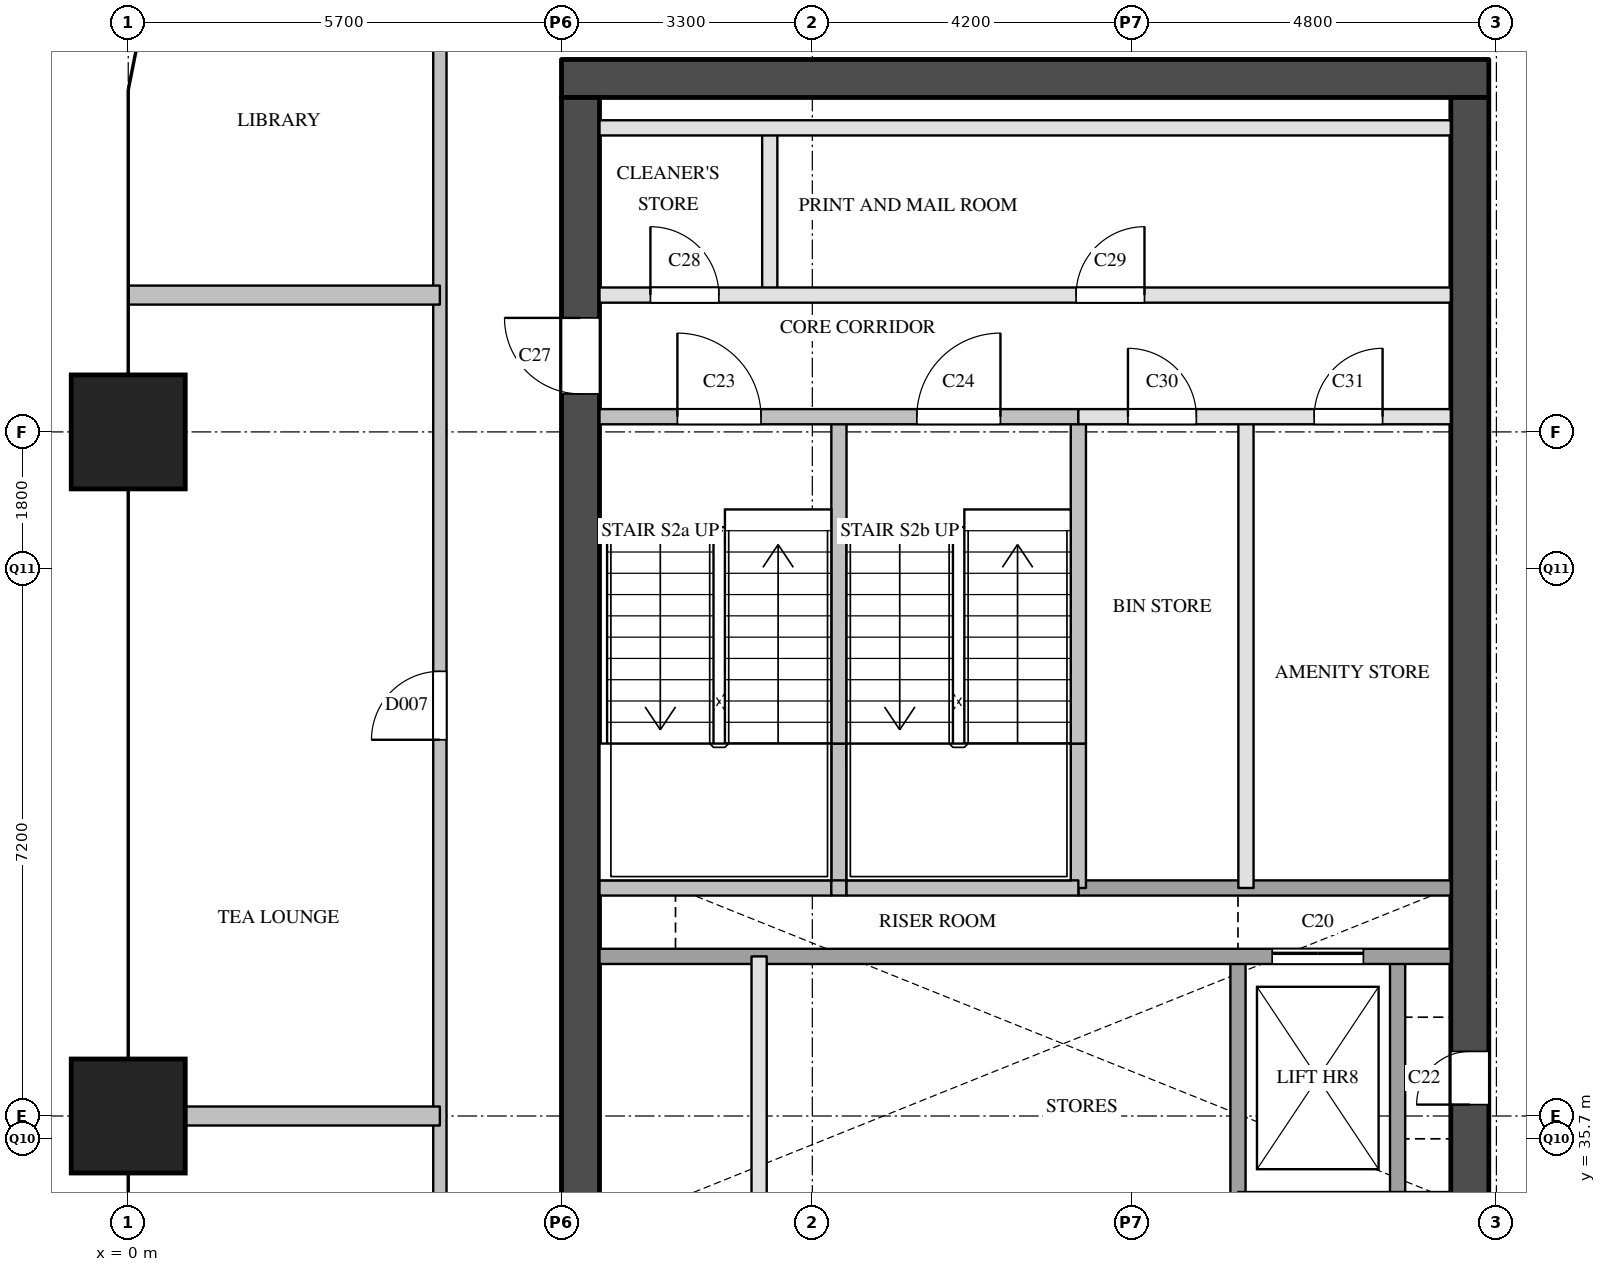
"""IFC4 building model, lengths in metres.
Left out: names, types, materials, properties, quantities, classifications, styles, units other than length and angle.
Written with IfcOpenShell. Run it as: python <this file> out.ifc"""

import sys

from ifc_helpers import new_model, si_unit, direction, frame, frame_2d, origin, origin_2d, place, context, subcontext, project, spatial, rectangle, extrude, element, fill, save


model = new_model("IFC4")
c1 = context("Model", 3, precision=1e-05, world=origin(), true_north=direction((0.0, 1.0)))
c2 = subcontext(c1, "Body", "Model", "MODEL_VIEW")
j1 = project(units=[si_unit("LENGTHUNIT", "METRE"), si_unit("PLANEANGLEUNIT", "RADIAN")], contexts=[c1])
p1 = place(None, origin())
s1 = spatial("IfcSite", under=j1, at=p1, CompositionType="ELEMENT")
p2 = place(p1, origin())
s2 = spatial("IfcBuilding", under=s1, at=p2, CompositionType="ELEMENT")
p3 = place(p2, frame((0.0, 0.0, 166.1)))
s3 = spatial("IfcBuildingStorey", under=s2, at=p3, CompositionType="ELEMENT", Elevation=166.1)
for number, where, z_axis, x_axis in (
    (1, (0.0, 36.0, 0.0), (0.0, 0.0, 1.0), (1.0, 0.0, 0.0)),
    (2, (0.0, 45.0, 0.0), (0.0, 0.0, 1.0), (1.0, 0.0, 0.0)),
):
    element("IfcColumn", number, at=place(p3, frame(where, z_axis=z_axis, x_axis=x_axis)), inside=s3, PredefinedType="COLUMN", context=c2, shape_type="SweptSolid", body=[
        extrude(rectangle(XDim=1.5, YDim=1.5, at=origin_2d()), origin(), (0.0, 0.0, 1.0), 3.9),
    ])
p4 = place(p3, frame((5.7, 49.65, 0.0), z_axis=(0.0, 0.0, 1.0), x_axis=(1.0, 0.0, 0.0)))
e3 = element("IfcWall", 3, at=p4, inside=s3, PredefinedType="SHEAR", context=c2, shape_type="SweptSolid", body=[
    extrude(rectangle(XDim=12.2, YDim=0.5, at=frame_2d((6.1, 0.0))), origin(), (0.0, 0.0, 1.0), 3.6),
])
p5 = place(p3, frame((5.95, 29.1, 0.0), z_axis=(0.0, 0.0, 1.0), x_axis=(0.0, 1.0, 0.0)))
e4 = element("IfcWall", 4, at=p5, inside=s3, PredefinedType="SHEAR", context=c2, shape_type="SweptSolid", body=[
    extrude(rectangle(XDim=20.3, YDim=0.5, at=frame_2d((10.15, 0.0))), origin(), (0.0, 0.0, 1.0), 3.6),
])
p6 = place(p5, frame((3.45, 0.0, 0.0)))
e5 = element("IfcOpeningElement", 5, at=p6, cuts=e4, PredefinedType="OPENING", context=c2, shape_type="SweptSolid", body=[
    extrude(rectangle(XDim=1.0, YDim=2.1, at=frame_2d((0.5, 1.05))), frame((0.0, 0.26, 0.0), z_axis=(0.0, -1.0, 0.0), x_axis=(1.0, 0.0, 0.0)), (0.0, 0.0, 1.0), 0.52),
])
p7 = place(p5, frame((16.4, 0.0, 0.0)))
e6 = element("IfcOpeningElement", 6, at=p7, cuts=e4, PredefinedType="OPENING", context=c2, shape_type="SweptSolid", body=[
    extrude(rectangle(XDim=1.0, YDim=2.1, at=frame_2d((0.5, 1.05))), frame((0.0, 0.26, 0.0), z_axis=(0.0, -1.0, 0.0), x_axis=(1.0, 0.0, 0.0)), (0.0, 0.0, 1.0), 0.52),
])
p8 = place(p3, frame((17.65, 29.1, 0.0), z_axis=(0.0, 0.0, 1.0), x_axis=(0.0, 1.0, 0.0)))
e7 = element("IfcWall", 7, at=p8, inside=s3, PredefinedType="SHEAR", context=c2, shape_type="SweptSolid", body=[
    extrude(rectangle(XDim=20.3, YDim=0.5, at=frame_2d((10.15, 0.0))), origin(), (0.0, 0.0, 1.0), 3.6),
])
p9 = place(p8, frame((1.25, 0.0, 0.0)))
e8 = element("IfcOpeningElement", 8, at=p9, cuts=e7, PredefinedType="OPENING", context=c2, shape_type="SweptSolid", body=[
    extrude(rectangle(XDim=0.7, YDim=2.1, at=frame_2d((0.35, 1.05))), frame((0.0, 0.26, 0.0), z_axis=(0.0, -1.0, 0.0), x_axis=(1.0, 0.0, 0.0)), (0.0, 0.0, 1.0), 0.52),
])
p10 = place(p8, frame((7.05, 0.0, 0.0)))
e9 = element("IfcOpeningElement", 9, at=p10, cuts=e7, PredefinedType="OPENING", context=c2, shape_type="SweptSolid", body=[
    extrude(rectangle(XDim=0.7, YDim=2.1, at=frame_2d((0.35, 1.05))), frame((0.0, 0.26, 0.0), z_axis=(0.0, -1.0, 0.0), x_axis=(1.0, 0.0, 0.0)), (0.0, 0.0, 1.0), 0.52),
])
p11 = place(p8, frame((3.6, 0.0, 0.0)))
e10 = element("IfcOpeningElement", 10, at=p11, cuts=e7, PredefinedType="OPENING", context=c2, shape_type="SweptSolid", body=[
    extrude(rectangle(XDim=1.8, YDim=2.1, at=frame_2d((0.9, 1.05))), frame((0.0, 0.26, 0.0), z_axis=(0.0, -1.0, 0.0), x_axis=(1.0, 0.0, 0.0)), (0.0, 0.0, 1.0), 0.52),
])
p12 = place(p3, frame((8.3, 33.8, 0.0), z_axis=(0.0, 0.0, 1.0), x_axis=(0.0, 1.0, 0.0)))
e11 = element("IfcWall", 11, at=p12, inside=s3, PredefinedType="PARTITIONING", context=c2, shape_type="SweptSolid", body=[
    extrude(rectangle(XDim=4.3, YDim=0.2, at=frame_2d((2.15, 0.0))), origin(), (0.0, 0.0, 1.0), 3.6),
])
p13 = place(p3, frame((8.44, 46.8, 0.0), z_axis=(0.0, 0.0, 1.0), x_axis=(0.0, 1.0, 0.0)))
e12 = element("IfcWall", 12, at=p13, inside=s3, PredefinedType="PARTITIONING", context=c2, shape_type="SweptSolid", body=[
    extrude(rectangle(XDim=2.2, YDim=0.2, at=frame_2d((1.1, 0.0))), origin(), (0.0, 0.0, 1.0), 3.6),
])
p14 = place(p3, frame((9.35, 39.0, 0.0), z_axis=(0.0, 0.0, 1.0), x_axis=(0.0, 1.0, 0.0)))
e13 = element("IfcWall", 13, at=p14, inside=s3, PredefinedType="SOLIDWALL", context=c2, shape_type="SweptSolid", body=[
    extrude(rectangle(XDim=1.9, YDim=0.2, at=frame_2d((0.95, 0.0))), origin(), (0.0, 0.0, 1.0), 3.6),
])
p15 = place(p3, frame((9.35, 40.9, 0.0), z_axis=(0.0, 0.0, 1.0), x_axis=(0.0, 1.0, 0.0)))
e14 = element("IfcWall", 14, at=p15, inside=s3, PredefinedType="SOLIDWALL", context=c2, shape_type="SweptSolid", body=[
    extrude(rectangle(XDim=4.3, YDim=0.2, at=frame_2d((2.15, 0.0))), origin(), (0.0, 0.0, 1.0), 3.6),
])
p16 = place(p3, frame((12.5, 39.0, 0.0), z_axis=(0.0, 0.0, 1.0), x_axis=(0.0, 1.0, 0.0)))
e15 = element("IfcWall", 15, at=p16, inside=s3, PredefinedType="SOLIDWALL", context=c2, shape_type="SweptSolid", body=[
    extrude(rectangle(XDim=1.9, YDim=0.2, at=frame_2d((0.95, 0.0))), origin(), (0.0, 0.0, 1.0), 3.6),
])
p17 = place(p3, frame((12.5, 40.9, 0.0), z_axis=(0.0, 0.0, 1.0), x_axis=(0.0, 1.0, 0.0)))
e16 = element("IfcWall", 16, at=p17, inside=s3, PredefinedType="SOLIDWALL", context=c2, shape_type="SweptSolid", body=[
    extrude(rectangle(XDim=4.3, YDim=0.2, at=frame_2d((2.15, 0.0))), origin(), (0.0, 0.0, 1.0), 3.6),
])
p18 = place(p3, frame((14.6, 34.9, 0.0), z_axis=(0.0, 0.0, 1.0), x_axis=(0.0, 1.0, 0.0)))
e17 = element("IfcWall", 17, at=p18, inside=s3, PredefinedType="SOLIDWALL", context=c2, shape_type="SweptSolid", body=[
    extrude(rectangle(XDim=3.2, YDim=0.2, at=frame_2d((1.6, 0.0))), origin(), (0.0, 0.0, 1.0), 3.6),
])
p19 = place(p3, frame((14.705, 39.0, 0.0), z_axis=(0.0, 0.0, 1.0), x_axis=(0.0, 1.0, 0.0)))
e18 = element("IfcWall", 18, at=p19, inside=s3, PredefinedType="PARTITIONING", context=c2, shape_type="SweptSolid", body=[
    extrude(rectangle(XDim=6.2, YDim=0.2, at=frame_2d((3.1, 0.0))), origin(), (0.0, 0.0, 1.0), 3.6),
])
p20 = place(p3, frame((16.7, 34.9, 0.0), z_axis=(0.0, 0.0, 1.0), x_axis=(0.0, 1.0, 0.0)))
e19 = element("IfcWall", 19, at=p20, inside=s3, PredefinedType="SOLIDWALL", context=c2, shape_type="SweptSolid", body=[
    extrude(rectangle(XDim=3.2, YDim=0.2, at=frame_2d((1.6, 0.0))), origin(), (0.0, 0.0, 1.0), 3.6),
])
p21 = place(p3, frame((6.2, 38.1, 0.0), z_axis=(0.0, 0.0, 1.0), x_axis=(1.0, 0.0, 0.0)))
e20 = element("IfcWall", 20, at=p21, inside=s3, PredefinedType="SOLIDWALL", context=c2, shape_type="SweptSolid", body=[
    extrude(rectangle(XDim=11.2, YDim=0.2, at=frame_2d((5.6, 0.0))), origin(), (0.0, 0.0, 1.0), 3.6),
])
p22 = place(p21, frame((8.85, 0.0, 0.0)))
e21 = element("IfcOpeningElement", 21, at=p22, cuts=e20, PredefinedType="OPENING", context=c2, shape_type="SweptSolid", body=[
    extrude(rectangle(XDim=1.2, YDim=2.1, at=frame_2d((0.6, 1.05))), frame((0.0, 0.11, 0.0), z_axis=(0.0, -1.0, 0.0), x_axis=(1.0, 0.0, 0.0)), (0.0, 0.0, 1.0), 0.22),
])
p23 = place(p3, frame((12.5, 39.0, 0.0), z_axis=(0.0, 0.0, 1.0), x_axis=(1.0, 0.0, 0.0)))
e22 = element("IfcWall", 22, at=p23, inside=s3, PredefinedType="SOLIDWALL", context=c2, shape_type="SweptSolid", body=[
    extrude(rectangle(XDim=4.9, YDim=0.2, at=frame_2d((2.45, 0.0))), origin(), (0.0, 0.0, 1.0), 3.6),
])
p24 = place(p3, frame((6.2, 39.0, 0.0), z_axis=(0.0, 0.0, 1.0), x_axis=(1.0, 0.0, 0.0)))
e23 = element("IfcWall", 23, at=p24, inside=s3, PredefinedType="SOLIDWALL", context=c2, shape_type="SweptSolid", body=[
    extrude(rectangle(XDim=3.05, YDim=0.2, at=frame_2d((1.525, 0.0))), origin(), (0.0, 0.0, 1.0), 3.6),
])
p25 = place(p3, frame((9.25, 39.0, 0.0), z_axis=(0.0, 0.0, 1.0), x_axis=(1.0, 0.0, 0.0)))
e24 = element("IfcWall", 24, at=p25, inside=s3, PredefinedType="SOLIDWALL", context=c2, shape_type="SweptSolid", body=[
    extrude(rectangle(XDim=0.2, YDim=0.2, at=frame_2d((0.1, 0.0))), origin(), (0.0, 0.0, 1.0), 3.6),
])
p26 = place(p3, frame((9.45, 39.0, 0.0), z_axis=(0.0, 0.0, 1.0), x_axis=(1.0, 0.0, 0.0)))
e25 = element("IfcWall", 25, at=p26, inside=s3, PredefinedType="SOLIDWALL", context=c2, shape_type="SweptSolid", body=[
    extrude(rectangle(XDim=3.05, YDim=0.2, at=frame_2d((1.525, 0.0))), origin(), (0.0, 0.0, 1.0), 3.6),
])
p27 = place(p3, frame((12.5, 45.2, 0.0), z_axis=(0.0, 0.0, 1.0), x_axis=(1.0, 0.0, 0.0)))
e26 = element("IfcWall", 26, at=p27, inside=s3, PredefinedType="PARTITIONING", context=c2, shape_type="SweptSolid", body=[
    extrude(rectangle(XDim=4.9, YDim=0.2, at=frame_2d((2.45, 0.0))), origin(), (0.0, 0.0, 1.0), 3.6),
])
p28 = place(p27, frame((0.653, 0.0, 0.0)))
e27 = element("IfcOpeningElement", 27, at=p28, cuts=e26, PredefinedType="OPENING", context=c2, shape_type="SweptSolid", body=[
    extrude(rectangle(XDim=0.9, YDim=2.1, at=frame_2d((0.45, 1.05))), frame((0.0, 0.11, 0.0), z_axis=(0.0, -1.0, 0.0), x_axis=(1.0, 0.0, 0.0)), (0.0, 0.0, 1.0), 0.22),
])
p29 = place(p27, frame((3.103, 0.0, 0.0)))
e28 = element("IfcOpeningElement", 28, at=p29, cuts=e26, PredefinedType="OPENING", context=c2, shape_type="SweptSolid", body=[
    extrude(rectangle(XDim=0.9, YDim=2.1, at=frame_2d((0.45, 1.05))), frame((0.0, 0.11, 0.0), z_axis=(0.0, -1.0, 0.0), x_axis=(1.0, 0.0, 0.0)), (0.0, 0.0, 1.0), 0.22),
])
p30 = place(p3, frame((6.2, 45.2, 0.0), z_axis=(0.0, 0.0, 1.0), x_axis=(1.0, 0.0, 0.0)))
e29 = element("IfcWall", 29, at=p30, inside=s3, PredefinedType="SOLIDWALL", context=c2, shape_type="SweptSolid", body=[
    extrude(rectangle(XDim=6.3, YDim=0.2, at=frame_2d((3.15, 0.0))), origin(), (0.0, 0.0, 1.0), 3.6),
])
p31 = place(p30, frame((1.025, 0.0, 0.0)))
e30 = element("IfcOpeningElement", 30, at=p31, cuts=e29, PredefinedType="OPENING", context=c2, shape_type="SweptSolid", body=[
    extrude(rectangle(XDim=1.1, YDim=2.1, at=frame_2d((0.55, 1.05))), frame((0.0, 0.11, 0.0), z_axis=(0.0, -1.0, 0.0), x_axis=(1.0, 0.0, 0.0)), (0.0, 0.0, 1.0), 0.22),
])
p32 = place(p30, frame((4.175, 0.0, 0.0)))
e31 = element("IfcOpeningElement", 31, at=p32, cuts=e29, PredefinedType="OPENING", context=c2, shape_type="SweptSolid", body=[
    extrude(rectangle(XDim=1.1, YDim=2.1, at=frame_2d((0.55, 1.05))), frame((0.0, 0.11, 0.0), z_axis=(0.0, -1.0, 0.0), x_axis=(1.0, 0.0, 0.0)), (0.0, 0.0, 1.0), 0.22),
])
p33 = place(p3, frame((6.2, 46.8, 0.0), z_axis=(0.0, 0.0, 1.0), x_axis=(1.0, 0.0, 0.0)))
e32 = element("IfcWall", 32, at=p33, inside=s3, PredefinedType="PARTITIONING", context=c2, shape_type="SweptSolid", body=[
    extrude(rectangle(XDim=11.2, YDim=0.2, at=frame_2d((5.6, 0.0))), origin(), (0.0, 0.0, 1.0), 3.6),
])
p34 = place(p33, frame((0.67, 0.0, 0.0)))
e33 = element("IfcOpeningElement", 33, at=p34, cuts=e32, PredefinedType="OPENING", context=c2, shape_type="SweptSolid", body=[
    extrude(rectangle(XDim=0.9, YDim=2.1, at=frame_2d((0.45, 1.05))), frame((0.0, 0.11, 0.0), z_axis=(0.0, -1.0, 0.0), x_axis=(1.0, 0.0, 0.0)), (0.0, 0.0, 1.0), 0.22),
])
p35 = place(p33, frame((6.27, 0.0, 0.0)))
e34 = element("IfcOpeningElement", 34, at=p35, cuts=e32, PredefinedType="OPENING", context=c2, shape_type="SweptSolid", body=[
    extrude(rectangle(XDim=0.9, YDim=2.1, at=frame_2d((0.45, 1.05))), frame((0.0, 0.11, 0.0), z_axis=(0.0, -1.0, 0.0), x_axis=(1.0, 0.0, 0.0)), (0.0, 0.0, 1.0), 0.22),
])
p36 = place(p3, frame((6.2, 49.0, 0.0), z_axis=(0.0, 0.0, 1.0), x_axis=(1.0, 0.0, 0.0)))
e35 = element("IfcWall", 35, at=p36, inside=s3, PredefinedType="PARTITIONING", context=c2, shape_type="SweptSolid", body=[
    extrude(rectangle(XDim=11.2, YDim=0.2, at=frame_2d((5.6, 0.0))), origin(), (0.0, 0.0, 1.0), 3.6),
])
p37 = place(p3, frame((4.1, 28.5, 0.0), z_axis=(0.0, 0.0, 1.0), x_axis=(0.0, 1.0, 0.0)))
e36 = element("IfcWall", 36, at=p37, inside=s3, PredefinedType="PARTITIONING", context=c2, shape_type="SweptSolid", body=[
    extrude(rectangle(XDim=23.0, YDim=0.175, at=frame_2d((11.5, 0.0))), origin(), (0.0, 0.0, 1.0), 3.6),
])
p38 = place(p37, frame((3.3, 0.0, 0.0)))
e37 = element("IfcOpeningElement", 37, at=p38, cuts=e36, PredefinedType="OPENING", context=c2, shape_type="SweptSolid", body=[
    extrude(rectangle(XDim=0.9, YDim=2.1, at=frame_2d((0.45, 1.05))), frame((0.0, 0.097, 0.0), z_axis=(0.0, -1.0, 0.0), x_axis=(1.0, 0.0, 0.0)), (0.0, 0.0, 1.0), 0.195),
])
p39 = place(p37, frame((12.45, 0.0, 0.0)))
e38 = element("IfcOpeningElement", 38, at=p39, cuts=e36, PredefinedType="OPENING", context=c2, shape_type="SweptSolid", body=[
    extrude(rectangle(XDim=0.9, YDim=2.1, at=frame_2d((0.45, 1.05))), frame((0.0, 0.097, 0.0), z_axis=(0.0, -1.0, 0.0), x_axis=(1.0, 0.0, 0.0)), (0.0, 0.0, 1.0), 0.195),
])
p40 = place(p3, frame((0.0, 36.0, 0.0), z_axis=(0.0, 0.0, 1.0), x_axis=(1.0, 0.0, 0.0)))
e39 = element("IfcWall", 39, at=p40, inside=s3, PredefinedType="PARTITIONING", context=c2, shape_type="SweptSolid", body=[
    extrude(rectangle(XDim=4.1, YDim=0.25, at=frame_2d((2.05, 0.0))), origin(), (0.0, 0.0, 1.0), 3.6),
])
p41 = place(p3, frame((0.0, 46.8, 0.0), z_axis=(0.0, 0.0, 1.0), x_axis=(1.0, 0.0, 0.0)))
e40 = element("IfcWall", 40, at=p41, inside=s3, PredefinedType="PARTITIONING", context=c2, shape_type="SweptSolid", body=[
    extrude(rectangle(XDim=4.1, YDim=0.25, at=frame_2d((2.05, 0.0))), origin(), (0.0, 0.0, 1.0), 2.6),
])
p42 = place(p22, origin())
e41 = element("IfcDoor", 41, at=p42, inside=s3, OperationType="SLIDING_TO_LEFT", PredefinedType="DOOR", context=c2, shape_type="SweptSolid", body=[
    extrude(rectangle(XDim=1.2, YDim=2.1, at=frame_2d((0.6, 1.05))), frame((0.0, 0.025, 0.0), z_axis=(0.0, -1.0, 0.0), x_axis=(1.0, 0.0, 0.0)), (0.0, 0.0, 1.0), 0.05),
])
fill(e21, e41)
p43 = place(p10, origin())
e42 = element("IfcDoor", 42, at=p43, inside=s3, OperationType="SINGLE_SWING_LEFT", PredefinedType="DOOR", context=c2, shape_type="SweptSolid", body=[
    extrude(rectangle(XDim=0.7, YDim=2.1, at=frame_2d((0.35, 1.05))), frame((0.0, 0.025, 0.0), z_axis=(0.0, -1.0, 0.0), x_axis=(1.0, 0.0, 0.0)), (0.0, 0.0, 1.0), 0.05),
])
fill(e9, e42)
p44 = place(p31, origin())
e43 = element("IfcDoor", 43, at=p44, inside=s3, OperationType="SINGLE_SWING_LEFT", PredefinedType="DOOR", context=c2, shape_type="SweptSolid", body=[
    extrude(rectangle(XDim=1.1, YDim=2.1, at=frame_2d((0.55, 1.05))), frame((0.0, 0.025, 0.0), z_axis=(0.0, -1.0, 0.0), x_axis=(1.0, 0.0, 0.0)), (0.0, 0.0, 1.0), 0.05),
])
fill(e30, e43)
p45 = place(p32, origin())
e44 = element("IfcDoor", 44, at=p45, inside=s3, OperationType="SINGLE_SWING_RIGHT", PredefinedType="DOOR", context=c2, shape_type="SweptSolid", body=[
    extrude(rectangle(XDim=1.1, YDim=2.1, at=frame_2d((0.55, 1.05))), frame((0.0, 0.025, 0.0), z_axis=(0.0, -1.0, 0.0), x_axis=(1.0, 0.0, 0.0)), (0.0, 0.0, 1.0), 0.05),
])
fill(e31, e44)
p46 = place(p7, origin())
e45 = element("IfcDoor", 45, at=p46, inside=s3, OperationType="SINGLE_SWING_RIGHT", PredefinedType="DOOR", context=c2, shape_type="SweptSolid", body=[
    extrude(rectangle(XDim=1.0, YDim=2.1, at=frame_2d((0.5, 1.05))), frame((0.0, 0.025, 0.0), z_axis=(0.0, -1.0, 0.0), x_axis=(1.0, 0.0, 0.0)), (0.0, 0.0, 1.0), 0.05),
])
fill(e6, e45)
p47 = place(p34, origin())
e46 = element("IfcDoor", 46, at=p47, inside=s3, OperationType="SINGLE_SWING_LEFT", PredefinedType="DOOR", context=c2, shape_type="SweptSolid", body=[
    extrude(rectangle(XDim=0.9, YDim=2.1, at=frame_2d((0.45, 1.05))), frame((0.0, 0.025, 0.0), z_axis=(0.0, -1.0, 0.0), x_axis=(1.0, 0.0, 0.0)), (0.0, 0.0, 1.0), 0.05),
])
fill(e33, e46)
p48 = place(p35, origin())
e47 = element("IfcDoor", 47, at=p48, inside=s3, OperationType="SINGLE_SWING_RIGHT", PredefinedType="DOOR", context=c2, shape_type="SweptSolid", body=[
    extrude(rectangle(XDim=0.9, YDim=2.1, at=frame_2d((0.45, 1.05))), frame((0.0, 0.025, 0.0), z_axis=(0.0, -1.0, 0.0), x_axis=(1.0, 0.0, 0.0)), (0.0, 0.0, 1.0), 0.05),
])
fill(e34, e47)
p49 = place(p28, origin())
e48 = element("IfcDoor", 48, at=p49, inside=s3, OperationType="SINGLE_SWING_LEFT", PredefinedType="DOOR", context=c2, shape_type="SweptSolid", body=[
    extrude(rectangle(XDim=0.9, YDim=2.1, at=frame_2d((0.45, 1.05))), frame((0.0, 0.025, 0.0), z_axis=(0.0, -1.0, 0.0), x_axis=(1.0, 0.0, 0.0)), (0.0, 0.0, 1.0), 0.05),
])
fill(e27, e48)
p50 = place(p29, origin())
e49 = element("IfcDoor", 49, at=p50, inside=s3, OperationType="SINGLE_SWING_RIGHT", PredefinedType="DOOR", context=c2, shape_type="SweptSolid", body=[
    extrude(rectangle(XDim=0.9, YDim=2.1, at=frame_2d((0.45, 1.05))), frame((0.0, 0.025, 0.0), z_axis=(0.0, -1.0, 0.0), x_axis=(1.0, 0.0, 0.0)), (0.0, 0.0, 1.0), 0.05),
])
fill(e28, e49)
p51 = place(p39, origin())
e50 = element("IfcDoor", 50, at=p51, inside=s3, OperationType="SINGLE_SWING_LEFT", PredefinedType="DOOR", context=c2, shape_type="SweptSolid", body=[
    extrude(rectangle(XDim=0.9, YDim=2.1, at=frame_2d((0.45, 1.05))), frame((0.0, 0.025, 0.0), z_axis=(0.0, -1.0, 0.0), x_axis=(1.0, 0.0, 0.0)), (0.0, 0.0, 1.0), 0.05),
])
fill(e38, e50)
save(model, sys.argv[1])
